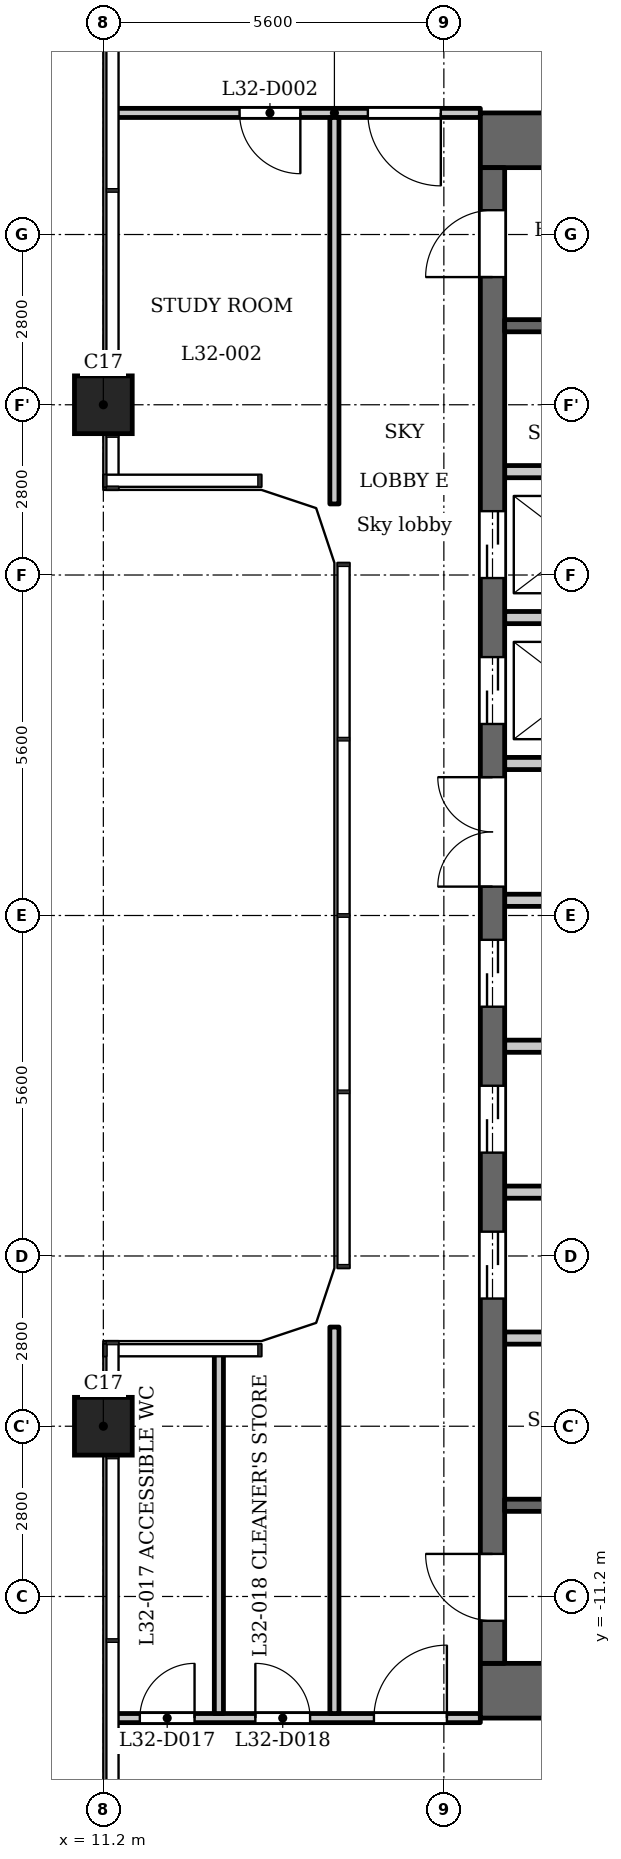
"""IFC4 building model, lengths in metres.
Left out: names, types, materials, properties, quantities, classifications, styles, units other than length and angle.
Written with IfcOpenShell. Run it as: python <this file> out.ifc"""

import sys

from ifc_helpers import new_model, si_unit, direction, frame, frame_2d, origin, origin_2d, place, context, subcontext, project, spatial, polyline, rectangle, outline, extrude, element, fill, save


model = new_model("IFC4")
c1 = context("Model", 3, precision=1e-05, world=origin(), true_north=direction((0.0, 1.0)))
c2 = subcontext(c1, "Body", "Model", "MODEL_VIEW")
j1 = project(units=[si_unit("LENGTHUNIT", "METRE"), si_unit("PLANEANGLEUNIT", "RADIAN")], contexts=[c1])
p1 = place(None, origin())
s1 = spatial("IfcSite", under=j1, at=p1, CompositionType="ELEMENT")
p2 = place(p1, origin())
s2 = spatial("IfcBuilding", under=s1, at=p2, CompositionType="ELEMENT")
p3 = place(p2, frame((0.0, 0.0, 125.3)))
s3 = spatial("IfcBuildingStorey", under=s2, at=p3, CompositionType="ELEMENT", Elevation=125.3)
for number, where, z_axis, x_axis in (
    (1, (11.2, -8.4, 0.0), (0.0, 0.0, 1.0), (1.0, 0.0, 0.0)),
    (2, (11.2, 8.4, 0.0), (0.0, 0.0, 1.0), (1.0, 0.0, 0.0)),
):
    element("IfcColumn", number, at=place(p3, frame(where, z_axis=z_axis, x_axis=x_axis)), inside=s3, PredefinedType="COLUMN", context=c2, shape_type="SweptSolid", body=[
        extrude(rectangle(XDim=0.95, YDim=0.95, at=origin_2d()), origin(), (0.0, 0.0, 1.0), 5.4),
    ])
for number, where, z_axis, x_axis in (
    (3, (17.4, 12.75, 0.0), (0.0, 0.0, 1.0), (1.0, 0.0, 0.0)),
    (4, (17.4, -12.75, 0.0), (0.0, 0.0, 1.0), (1.0, 0.0, 0.0)),
):
    element("IfcWall", number, at=place(p3, frame(where, z_axis=z_axis, x_axis=x_axis)), inside=s3, PredefinedType="SHEAR", context=c2, shape_type="SweptSolid", body=[
        extrude(rectangle(XDim=10.4, YDim=0.9, at=frame_2d((5.2, 0.0))), origin(), (0.0, 0.0, 1.0), 4.95),
    ])
p4 = place(p3, frame((17.6, -12.3, 0.0), z_axis=(0.0, 0.0, 1.0), x_axis=(0.0, 1.0, 0.0)))
e5 = element("IfcWall", 5, at=p4, inside=s3, PredefinedType="SHEAR", context=c2, shape_type="SweptSolid", body=[
    extrude(rectangle(XDim=24.6, YDim=0.4, at=frame_2d((12.3, 0.0))), origin(), (0.0, 0.0, 1.0), 4.95),
])
p5 = place(p4, frame((6.0, 0.0, 0.0)))
e6 = element("IfcOpeningElement", 6, at=p5, cuts=e5, PredefinedType="OPENING", context=c2, shape_type="SweptSolid", body=[
    extrude(rectangle(XDim=1.1, YDim=2.1, at=frame_2d((0.55, 1.05))), frame((0.0, 0.21, 0.0), z_axis=(0.0, -1.0, 0.0), x_axis=(1.0, 0.0, 0.0)), (0.0, 0.0, 1.0), 0.42),
])
p6 = place(p4, frame((8.4, 0.0, 0.0)))
e7 = element("IfcOpeningElement", 7, at=p6, cuts=e5, PredefinedType="OPENING", context=c2, shape_type="SweptSolid", body=[
    extrude(rectangle(XDim=1.1, YDim=2.1, at=frame_2d((0.55, 1.05))), frame((0.0, 0.21, 0.0), z_axis=(0.0, -1.0, 0.0), x_axis=(1.0, 0.0, 0.0)), (0.0, 0.0, 1.0), 0.42),
])
p7 = place(p4, frame((10.8, 0.0, 0.0)))
e8 = element("IfcOpeningElement", 8, at=p7, cuts=e5, PredefinedType="OPENING", context=c2, shape_type="SweptSolid", body=[
    extrude(rectangle(XDim=1.1, YDim=2.1, at=frame_2d((0.55, 1.05))), frame((0.0, 0.21, 0.0), z_axis=(0.0, -1.0, 0.0), x_axis=(1.0, 0.0, 0.0)), (0.0, 0.0, 1.0), 0.42),
])
p8 = place(p4, frame((15.45, 0.0, 0.0)))
e9 = element("IfcOpeningElement", 9, at=p8, cuts=e5, PredefinedType="OPENING", context=c2, shape_type="SweptSolid", body=[
    extrude(rectangle(XDim=1.1, YDim=2.1, at=frame_2d((0.55, 1.05))), frame((0.0, 0.21, 0.0), z_axis=(0.0, -1.0, 0.0), x_axis=(1.0, 0.0, 0.0)), (0.0, 0.0, 1.0), 0.42),
])
p9 = place(p4, frame((17.85, 0.0, 0.0)))
e10 = element("IfcOpeningElement", 10, at=p9, cuts=e5, PredefinedType="OPENING", context=c2, shape_type="SweptSolid", body=[
    extrude(rectangle(XDim=1.1, YDim=2.1, at=frame_2d((0.55, 1.05))), frame((0.0, 0.21, 0.0), z_axis=(0.0, -1.0, 0.0), x_axis=(1.0, 0.0, 0.0)), (0.0, 0.0, 1.0), 0.42),
])
p10 = place(p4, frame((22.8, 0.0, 0.0)))
e11 = element("IfcOpeningElement", 11, at=p10, cuts=e5, PredefinedType="OPENING", context=c2, shape_type="SweptSolid", body=[
    extrude(rectangle(XDim=1.1, YDim=2.1, at=frame_2d((0.55, 1.05))), frame((0.0, 0.21, 0.0), z_axis=(0.0, -1.0, 0.0), x_axis=(1.0, 0.0, 0.0)), (0.0, 0.0, 1.0), 0.42),
])
p11 = place(p4, frame((0.7, 0.0, 0.0)))
e12 = element("IfcOpeningElement", 12, at=p11, cuts=e5, PredefinedType="OPENING", context=c2, shape_type="SweptSolid", body=[
    extrude(rectangle(XDim=1.1, YDim=2.1, at=frame_2d((0.55, 1.05))), frame((0.0, 0.21, 0.0), z_axis=(0.0, -1.0, 0.0), x_axis=(1.0, 0.0, 0.0)), (0.0, 0.0, 1.0), 0.42),
])
p12 = place(p4, frame((12.775, 0.0, 0.0)))
e13 = element("IfcOpeningElement", 13, at=p12, cuts=e5, PredefinedType="OPENING", context=c2, shape_type="SweptSolid", body=[
    extrude(rectangle(XDim=1.8, YDim=2.1, at=frame_2d((0.9, 1.05))), frame((0.0, 0.21, 0.0), z_axis=(0.0, -1.0, 0.0), x_axis=(1.0, 0.0, 0.0)), (0.0, 0.0, 1.0), 0.42),
])
p13 = place(p3, frame((17.8, -9.7, 0.0), z_axis=(0.0, 0.0, 1.0), x_axis=(1.0, 0.0, 0.0)))
e14 = element("IfcWall", 14, at=p13, inside=s3, PredefinedType="SHEAR", context=c2, shape_type="SweptSolid", body=[
    extrude(rectangle(XDim=8.3, YDim=0.2, at=frame_2d((4.15, 0.0))), origin(), (0.0, 0.0, 1.0), 4.95),
])
p14 = place(p13, frame((0.85, 0.0, 0.0)))
e15 = element("IfcOpeningElement", 15, at=p14, cuts=e14, PredefinedType="OPENING", context=c2, shape_type="SweptSolid", body=[
    extrude(rectangle(XDim=1.1, YDim=2.1, at=frame_2d((0.55, 1.05))), frame((0.0, 0.11, 0.0), z_axis=(0.0, -1.0, 0.0), x_axis=(1.0, 0.0, 0.0)), (0.0, 0.0, 1.0), 0.22),
])
p15 = place(p13, frame((3.75, 0.0, 0.0)))
e16 = element("IfcOpeningElement", 16, at=p15, cuts=e14, PredefinedType="OPENING", context=c2, shape_type="SweptSolid", body=[
    extrude(rectangle(XDim=1.1, YDim=2.1, at=frame_2d((0.55, 1.05))), frame((0.0, 0.11, 0.0), z_axis=(0.0, -1.0, 0.0), x_axis=(1.0, 0.0, 0.0)), (0.0, 0.0, 1.0), 0.22),
])
for number, where, z_axis, x_axis in (
    (17, (17.8, -6.95, 0.0), (0.0, 0.0, 1.0), (1.0, 0.0, 0.0)),
    (18, (17.8, -4.55, 0.0), (0.0, 0.0, 1.0), (1.0, 0.0, 0.0)),
    (19, (17.8, -2.15, 0.0), (0.0, 0.0, 1.0), (1.0, 0.0, 0.0)),
):
    element("IfcWall", number, at=place(p3, frame(where, z_axis=z_axis, x_axis=x_axis)), inside=s3, PredefinedType="PARTITIONING", context=c2, shape_type="SweptSolid", body=[
        extrude(rectangle(XDim=2.8, YDim=0.2, at=frame_2d((1.4, 0.0))), origin(), (0.0, 0.0, 1.0), 4.95),
    ])
for number, where, z_axis, x_axis in (
    (20, (17.8, 0.25, 0.0), (0.0, 0.0, 1.0), (1.0, 0.0, 0.0)),
    (21, (17.8, 2.5, 0.0), (0.0, 0.0, 1.0), (1.0, 0.0, 0.0)),
):
    element("IfcWall", number, at=place(p3, frame(where, z_axis=z_axis, x_axis=x_axis)), inside=s3, PredefinedType="PARTITIONING", context=c2, shape_type="SweptSolid", body=[
        extrude(rectangle(XDim=3.0, YDim=0.2, at=frame_2d((1.5, 0.0))), origin(), (0.0, 0.0, 1.0), 4.95),
    ])
for number, where, z_axis, x_axis in (
    (22, (17.8, 4.9, 0.0), (0.0, 0.0, 1.0), (1.0, 0.0, 0.0)),
    (23, (17.8, 7.3, 0.0), (0.0, 0.0, 1.0), (1.0, 0.0, 0.0)),
):
    element("IfcWall", number, at=place(p3, frame(where, z_axis=z_axis, x_axis=x_axis)), inside=s3, PredefinedType="PARTITIONING", context=c2, shape_type="SweptSolid", body=[
        extrude(rectangle(XDim=2.8, YDim=0.2, at=frame_2d((1.4, 0.0))), origin(), (0.0, 0.0, 1.0), 4.95),
    ])
p16 = place(p3, frame((17.8, 9.7, 0.0), z_axis=(0.0, 0.0, 1.0), x_axis=(1.0, 0.0, 0.0)))
e24 = element("IfcWall", 24, at=p16, inside=s3, PredefinedType="SHEAR", context=c2, shape_type="SweptSolid", body=[
    extrude(rectangle(XDim=8.3, YDim=0.2, at=frame_2d((4.15, 0.0))), origin(), (0.0, 0.0, 1.0), 4.95),
])
p17 = place(p16, frame((0.85, 0.0, 0.0)))
e25 = element("IfcOpeningElement", 25, at=p17, cuts=e24, PredefinedType="OPENING", context=c2, shape_type="SweptSolid", body=[
    extrude(rectangle(XDim=1.1, YDim=2.1, at=frame_2d((0.55, 1.05))), frame((0.0, 0.11, 0.0), z_axis=(0.0, -1.0, 0.0), x_axis=(1.0, 0.0, 0.0)), (0.0, 0.0, 1.0), 0.22),
])
p18 = place(p16, frame((3.75, 0.0, 0.0)))
e26 = element("IfcOpeningElement", 26, at=p18, cuts=e24, PredefinedType="OPENING", context=c2, shape_type="SweptSolid", body=[
    extrude(rectangle(XDim=1.1, YDim=2.1, at=frame_2d((0.55, 1.05))), frame((0.0, 0.11, 0.0), z_axis=(0.0, -1.0, 0.0), x_axis=(1.0, 0.0, 0.0)), (0.0, 0.0, 1.0), 0.22),
])
p19 = place(p3, frame((11.384, -13.2, 0.0), z_axis=(0.0, 0.0, 1.0), x_axis=(1.0, 0.0, 0.0)))
e27 = element("IfcWall", 27, at=p19, inside=s3, PredefinedType="PARTITIONING", context=c2, shape_type="SweptSolid", body=[
    extrude(rectangle(XDim=6.016, YDim=0.15, at=frame_2d((3.008, 0.0))), origin(), (0.0, 0.0, 1.0), 4.95),
])
p20 = place(p19, frame((4.266, 0.0, 0.0)))
e28 = element("IfcOpeningElement", 28, at=p20, cuts=e27, PredefinedType="OPENING", context=c2, shape_type="SweptSolid", body=[
    extrude(rectangle(XDim=1.2, YDim=2.1, at=frame_2d((0.6, 1.05))), frame((0.0, 0.085, 0.0), z_axis=(0.0, -1.0, 0.0), x_axis=(1.0, 0.0, 0.0)), (0.0, 0.0, 1.0), 0.17),
])
p21 = place(p19, frame((0.416, 0.0, 0.0)))
e29 = element("IfcOpeningElement", 29, at=p21, cuts=e27, PredefinedType="OPENING", context=c2, shape_type="SweptSolid", body=[
    extrude(rectangle(XDim=0.9, YDim=2.1, at=frame_2d((0.45, 1.05))), frame((0.0, 0.085, 0.0), z_axis=(0.0, -1.0, 0.0), x_axis=(1.0, 0.0, 0.0)), (0.0, 0.0, 1.0), 0.17),
])
p22 = place(p19, frame((2.316, 0.0, 0.0)))
e30 = element("IfcOpeningElement", 30, at=p22, cuts=e27, PredefinedType="OPENING", context=c2, shape_type="SweptSolid", body=[
    extrude(rectangle(XDim=0.9, YDim=2.1, at=frame_2d((0.45, 1.05))), frame((0.0, 0.085, 0.0), z_axis=(0.0, -1.0, 0.0), x_axis=(1.0, 0.0, 0.0)), (0.0, 0.0, 1.0), 0.17),
])
p23 = place(p3, frame((11.384, 13.2, 0.0), z_axis=(0.0, 0.0, 1.0), x_axis=(1.0, 0.0, 0.0)))
e31 = element("IfcWall", 31, at=p23, inside=s3, PredefinedType="PARTITIONING", context=c2, shape_type="SweptSolid", body=[
    extrude(rectangle(XDim=6.016, YDim=0.15, at=frame_2d((3.008, 0.0))), origin(), (0.0, 0.0, 1.0), 4.95),
])
p24 = place(p23, frame((4.166, 0.0, 0.0)))
e32 = element("IfcOpeningElement", 32, at=p24, cuts=e31, PredefinedType="OPENING", context=c2, shape_type="SweptSolid", body=[
    extrude(rectangle(XDim=1.2, YDim=2.1, at=frame_2d((0.6, 1.05))), frame((0.0, 0.085, 0.0), z_axis=(0.0, -1.0, 0.0), x_axis=(1.0, 0.0, 0.0)), (0.0, 0.0, 1.0), 0.17),
])
p25 = place(p23, frame((2.056, 0.0, 0.0)))
e33 = element("IfcOpeningElement", 33, at=p25, cuts=e31, PredefinedType="OPENING", context=c2, shape_type="SweptSolid", body=[
    extrude(rectangle(XDim=1.0, YDim=2.1, at=frame_2d((0.5, 1.05))), frame((0.0, 0.085, 0.0), z_axis=(0.0, -1.0, 0.0), x_axis=(1.0, 0.0, 0.0)), (0.0, 0.0, 1.0), 0.17),
])
p26 = place(p3, frame((13.1, -13.125, 0.0), z_axis=(0.0, 0.0, 1.0), x_axis=(0.0, 1.0, 0.0)))
e34 = element("IfcWall", 34, at=p26, inside=s3, PredefinedType="PARTITIONING", context=c2, shape_type="SweptSolid", body=[
    extrude(rectangle(XDim=5.941, YDim=0.15, at=frame_2d((2.97, 0.0))), origin(), (0.0, 0.0, 1.0), 4.95),
])
for number, where, z_axis, x_axis in (
    (35, (15.0, -13.125, 0.0), (0.0, 0.0, 1.0), (0.0, 1.0, 0.0)),
    (36, (15.0, 6.769, 0.0), (0.0, 0.0, 1.0), (0.0, 1.0, 0.0)),
):
    element("IfcWall", number, at=place(p3, frame(where, z_axis=z_axis, x_axis=x_axis)), inside=s3, PredefinedType="PARTITIONING", context=c2, shape_type="SweptSolid", body=[
        extrude(rectangle(XDim=6.356, YDim=0.15, at=frame_2d((3.178, 0.0))), origin(), (0.0, 0.0, 1.0), 4.95),
    ])
p27 = place(p3, origin())
e37 = element("IfcWall", 37, at=p27, inside=s3, PredefinedType="SOLIDWALL", context=c2, shape_type="SweptSolid", body=[
    extrude(outline(polyline([(13.8, 7.0), (14.7, 6.7), (15.0, 5.8), (15.3, 5.8), (15.3, 5.849), (14.937, 6.937), (13.849, 7.3), (13.8, 7.3), (13.8, 7.0)])), origin(), (0.0, 0.0, 1.0), 4.95),
])
e38 = element("IfcWall", 38, at=p27, inside=s3, PredefinedType="SOLIDWALL", context=c2, shape_type="SweptSolid", body=[
    extrude(outline(polyline([(15.0, -5.8), (14.7, -6.7), (13.8, -7.0), (13.8, -7.3), (13.849, -7.3), (14.937, -6.937), (15.3, -5.849), (15.3, -5.8), (15.0, -5.8)])), origin(), (0.0, 0.0, 1.0), 4.95),
])
p28 = place(p5, origin())
e39 = element("IfcDoor", 39, at=p28, inside=s3, OperationType="DOUBLE_DOOR_SLIDING", PredefinedType="DOOR", context=c2, shape_type="SweptSolid", body=[
    extrude(rectangle(XDim=1.1, YDim=2.1, at=frame_2d((0.55, 1.05))), frame((0.0, 0.025, 0.0), z_axis=(0.0, -1.0, 0.0), x_axis=(1.0, 0.0, 0.0)), (0.0, 0.0, 1.0), 0.05),
])
fill(e6, e39)
p29 = place(p6, origin())
e40 = element("IfcDoor", 40, at=p29, inside=s3, OperationType="DOUBLE_DOOR_SLIDING", PredefinedType="DOOR", context=c2, shape_type="SweptSolid", body=[
    extrude(rectangle(XDim=1.1, YDim=2.1, at=frame_2d((0.55, 1.05))), frame((0.0, 0.025, 0.0), z_axis=(0.0, -1.0, 0.0), x_axis=(1.0, 0.0, 0.0)), (0.0, 0.0, 1.0), 0.05),
])
fill(e7, e40)
p30 = place(p7, origin())
e41 = element("IfcDoor", 41, at=p30, inside=s3, OperationType="DOUBLE_DOOR_SLIDING", PredefinedType="DOOR", context=c2, shape_type="SweptSolid", body=[
    extrude(rectangle(XDim=1.1, YDim=2.1, at=frame_2d((0.55, 1.05))), frame((0.0, 0.025, 0.0), z_axis=(0.0, -1.0, 0.0), x_axis=(1.0, 0.0, 0.0)), (0.0, 0.0, 1.0), 0.05),
])
fill(e8, e41)
p31 = place(p8, origin())
e42 = element("IfcDoor", 42, at=p31, inside=s3, OperationType="DOUBLE_DOOR_SLIDING", PredefinedType="DOOR", context=c2, shape_type="SweptSolid", body=[
    extrude(rectangle(XDim=1.1, YDim=2.1, at=frame_2d((0.55, 1.05))), frame((0.0, 0.025, 0.0), z_axis=(0.0, -1.0, 0.0), x_axis=(1.0, 0.0, 0.0)), (0.0, 0.0, 1.0), 0.05),
])
fill(e9, e42)
p32 = place(p9, origin())
e43 = element("IfcDoor", 43, at=p32, inside=s3, OperationType="DOUBLE_DOOR_SLIDING", PredefinedType="DOOR", context=c2, shape_type="SweptSolid", body=[
    extrude(rectangle(XDim=1.1, YDim=2.1, at=frame_2d((0.55, 1.05))), frame((0.0, 0.025, 0.0), z_axis=(0.0, -1.0, 0.0), x_axis=(1.0, 0.0, 0.0)), (0.0, 0.0, 1.0), 0.05),
])
fill(e10, e43)
p33 = place(p10, origin())
e44 = element("IfcDoor", 44, at=p33, inside=s3, OperationType="SINGLE_SWING_RIGHT", PredefinedType="DOOR", context=c2, shape_type="SweptSolid", body=[
    extrude(rectangle(XDim=1.1, YDim=2.1, at=frame_2d((0.55, 1.05))), frame((0.0, 0.025, 0.0), z_axis=(0.0, -1.0, 0.0), x_axis=(1.0, 0.0, 0.0)), (0.0, 0.0, 1.0), 0.05),
])
fill(e11, e44)
p34 = place(p11, origin())
e45 = element("IfcDoor", 45, at=p34, inside=s3, OperationType="SINGLE_SWING_LEFT", PredefinedType="DOOR", context=c2, shape_type="SweptSolid", body=[
    extrude(rectangle(XDim=1.1, YDim=2.1, at=frame_2d((0.55, 1.05))), frame((0.0, 0.025, 0.0), z_axis=(0.0, -1.0, 0.0), x_axis=(1.0, 0.0, 0.0)), (0.0, 0.0, 1.0), 0.05),
])
fill(e12, e45)
p35 = place(p12, origin())
e46 = element("IfcDoor", 46, at=p35, inside=s3, OperationType="DOUBLE_DOOR_SINGLE_SWING", PredefinedType="DOOR", context=c2, shape_type="SweptSolid", body=[
    extrude(rectangle(XDim=1.8, YDim=2.1, at=frame_2d((0.9, 1.05))), frame((0.0, 0.025, 0.0), z_axis=(0.0, -1.0, 0.0), x_axis=(1.0, 0.0, 0.0)), (0.0, 0.0, 1.0), 0.05),
])
fill(e13, e46)
p36 = place(p24, origin())
e47 = element("IfcDoor", 47, at=p36, inside=s3, OperationType="SINGLE_SWING_RIGHT", PredefinedType="DOOR", context=c2, shape_type="SweptSolid", body=[
    extrude(rectangle(XDim=1.2, YDim=2.1, at=frame_2d((0.6, 1.05))), frame((0.0, 0.025, 0.0), z_axis=(0.0, -1.0, 0.0), x_axis=(1.0, 0.0, 0.0)), (0.0, 0.0, 1.0), 0.05),
])
fill(e32, e47)
p37 = place(p25, origin())
e48 = element("IfcDoor", 48, at=p37, inside=s3, OperationType="SINGLE_SWING_RIGHT", PredefinedType="DOOR", context=c2, shape_type="SweptSolid", body=[
    extrude(rectangle(XDim=1.0, YDim=2.1, at=frame_2d((0.5, 1.05))), frame((0.0, 0.025, 0.0), z_axis=(0.0, -1.0, 0.0), x_axis=(1.0, 0.0, 0.0)), (0.0, 0.0, 1.0), 0.05),
])
fill(e33, e48)
p38 = place(p20, origin())
e49 = element("IfcDoor", 49, at=p38, inside=s3, OperationType="SINGLE_SWING_LEFT", PredefinedType="DOOR", context=c2, shape_type="SweptSolid", body=[
    extrude(rectangle(XDim=1.2, YDim=2.1, at=frame_2d((0.6, 1.05))), frame((0.0, 0.025, 0.0), z_axis=(0.0, -1.0, 0.0), x_axis=(1.0, 0.0, 0.0)), (0.0, 0.0, 1.0), 0.05),
])
fill(e28, e49)
p39 = place(p21, origin())
e50 = element("IfcDoor", 50, at=p39, inside=s3, OperationType="SINGLE_SWING_LEFT", PredefinedType="DOOR", context=c2, shape_type="SweptSolid", body=[
    extrude(rectangle(XDim=0.9, YDim=2.1, at=frame_2d((0.45, 1.05))), frame((0.0, 0.025, 0.0), z_axis=(0.0, -1.0, 0.0), x_axis=(1.0, 0.0, 0.0)), (0.0, 0.0, 1.0), 0.05),
])
fill(e29, e50)
p40 = place(p22, origin())
e51 = element("IfcDoor", 51, at=p40, inside=s3, OperationType="SINGLE_SWING_RIGHT", PredefinedType="DOOR", context=c2, shape_type="SweptSolid", body=[
    extrude(rectangle(XDim=0.9, YDim=2.1, at=frame_2d((0.45, 1.05))), frame((0.0, 0.025, 0.0), z_axis=(0.0, -1.0, 0.0), x_axis=(1.0, 0.0, 0.0)), (0.0, 0.0, 1.0), 0.05),
])
fill(e30, e51)
save(model, sys.argv[1])
